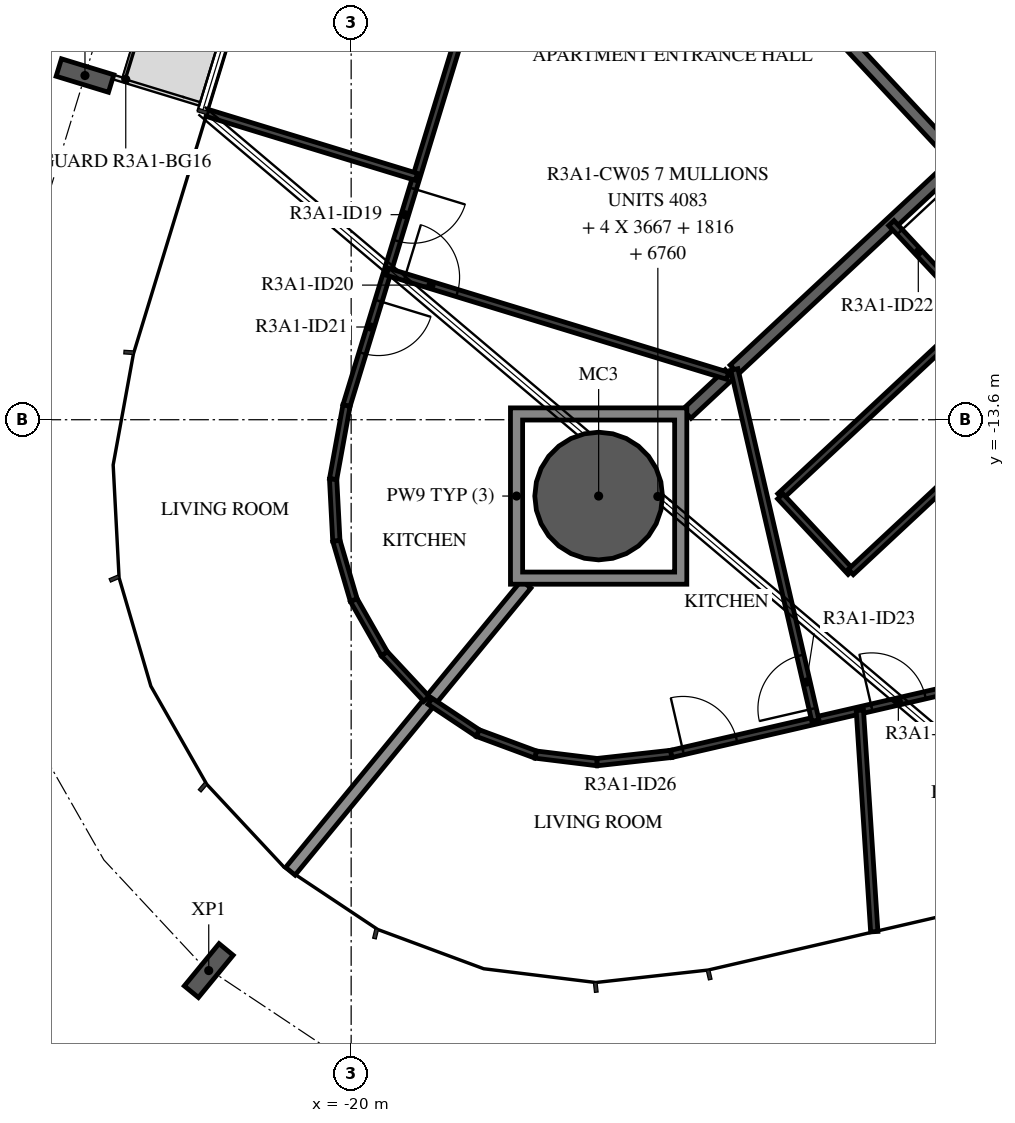
"""IFC4 building model, lengths in metres.
Left out: names, types, materials, properties, quantities, classifications, styles, units other than length and angle.
Written with IfcOpenShell. Run it as: python <this file> out.ifc"""

import sys

from ifc_helpers import new_model, si_unit, direction, frame, frame_2d, origin, origin_2d, place, context, subcontext, project, spatial, polyline, rectangle, hollow_circle, i_section, outline, extrude, element, fill, save


model = new_model("IFC4")
c1 = context("Model", 3, precision=1e-05, world=origin(), true_north=direction((0.0, 1.0)))
c2 = subcontext(c1, "Body", "Model", "MODEL_VIEW")
j1 = project(units=[si_unit("LENGTHUNIT", "METRE"), si_unit("PLANEANGLEUNIT", "RADIAN")], contexts=[c1])
p1 = place(None, origin())
s1 = spatial("IfcSite", under=j1, at=p1, CompositionType="ELEMENT")
p2 = place(p1, origin())
s2 = spatial("IfcBuilding", under=s1, at=p2, CompositionType="ELEMENT")
p3 = place(p2, frame((0.0, 0.0, 116.9)))
s3 = spatial("IfcBuildingStorey", under=s2, at=p3, CompositionType="ELEMENT", Elevation=116.9)
p4 = place(p3, frame((-15.93, -14.855, -0.38), z_axis=(0.0, 0.0, 1.0), x_axis=(1.0, 0.0, 0.0)))
e1 = element("IfcColumn", 1, at=p4, inside=s3, PredefinedType="COLUMN", context=c2, shape_type="SweptSolid", body=[
    extrude(hollow_circle(Radius=1.05, WallThickness=0.05, at=origin_2d()), origin(), (0.0, 0.0, 1.0), 3.5),
])
for number, where, z_axis, x_axis in (
    (2, (-24.377, -7.94, -0.38), (0.0, 0.0, 1.0), (0.292, 0.956, 0.0)),
    (3, (-22.342, -22.659, -0.38), (0.0, 0.0, 1.0), (-0.773, 0.635, 0.0)),
):
    element("IfcColumn", number, at=place(p3, frame(where, z_axis=z_axis, x_axis=x_axis)), inside=s3, PredefinedType="COLUMN", context=c2, shape_type="SweptSolid", body=[
        extrude(i_section(OverallWidth=0.3, OverallDepth=0.9, WebThickness=0.019, FlangeThickness=0.035, FilletRadius=0.03, at=origin_2d()), origin(), (0.0, 0.0, 1.0), 3.5),
    ])
p5 = place(p3, frame((-12.523, -6.659, 0.0), z_axis=(0.0, 0.0, 1.0), x_axis=(0.682001841105, -0.731350455479, 0.0)))
e4 = element("IfcWall", 4, at=p5, inside=s3, PredefinedType="STANDARD", context=c2, shape_type="SweptSolid", body=[
    extrude(rectangle(XDim=7.342, YDim=0.2, at=frame_2d((3.671, 0.0))), origin(), (0.0, 0.0, 1.0), 3.12),
])
p6 = place(p3, frame((-13.699, -12.774, 0.0), z_axis=(0.0, 0.0, 1.0), x_axis=(0.731353758457, 0.681998299111, 0.0)))
e5 = element("IfcWall", 5, at=p6, inside=s3, PredefinedType="STANDARD", context=c2, shape_type="SweptSolid", body=[
    extrude(rectangle(XDim=5.031, YDim=0.2, at=frame_2d((2.515, 0.0))), origin(), (0.0, 0.0, 1.0), 3.12),
])
p7 = place(p3, frame((-21.0, -21.025, 0.0), z_axis=(0.0, 0.0, 1.0), x_axis=(0.634846795952, 0.772638043116, 0.0)))
e6 = element("IfcWall", 6, at=p7, inside=s3, PredefinedType="STANDARD", context=c2, shape_type="SweptSolid", body=[
    extrude(rectangle(XDim=6.109, YDim=0.2, at=frame_2d((3.055, 0.0))), origin(), (0.0, 0.0, 1.0), 2.73),
])
p8 = place(p3, frame((-14.48, -13.503, 0.0), z_axis=(0.0, 0.0, 1.0), x_axis=(0.73152991834, 0.681809341806, 0.0)))
e7 = element("IfcWall", 7, at=p8, inside=s3, PredefinedType="STANDARD", context=c2, shape_type="SweptSolid", body=[
    extrude(rectangle(XDim=0.958, YDim=0.2, at=frame_2d((0.479, 0.0))), origin(), (0.0, 0.0, 1.0), 3.12),
])
p9 = place(p3, frame((-16.579, -1.928, 0.0), z_axis=(0.0, 0.0, 1.0), x_axis=(-0.29236733738, -0.956306091183, 0.0)))
e8 = element("IfcWall", 8, at=p9, inside=s3, PredefinedType="PARTITIONING", context=c2, shape_type="SweptSolid", body=[
    extrude(rectangle(XDim=11.963, YDim=0.12, at=frame_2d((5.981, 0.0))), origin(), (0.0, 0.0, 1.0), 3.12),
])
p10 = place(p9, frame((3.271, 0.0, 0.0)))
e9 = element("IfcOpeningElement", 9, at=p10, cuts=e8, PredefinedType="OPENING", context=c2, shape_type="SweptSolid", body=[
    extrude(rectangle(XDim=0.9, YDim=2.1, at=frame_2d((0.45, 1.05))), frame((0.0, 0.07, 0.0), z_axis=(0.0, -1.0, 0.0), x_axis=(1.0, 0.0, 0.0)), (0.0, 0.0, 1.0), 0.14),
])
p11 = place(p9, frame((8.229, 0.0, 0.0)))
e10 = element("IfcOpeningElement", 10, at=p11, cuts=e8, PredefinedType="OPENING", context=c2, shape_type="SweptSolid", body=[
    extrude(rectangle(XDim=0.9, YDim=2.1, at=frame_2d((0.45, 1.05))), frame((0.0, 0.07, 0.0), z_axis=(0.0, -1.0, 0.0), x_axis=(1.0, 0.0, 0.0)), (0.0, 0.0, 1.0), 0.14),
])
p12 = place(p9, frame((10.161, 0.0, 0.0)))
e11 = element("IfcOpeningElement", 11, at=p12, cuts=e8, PredefinedType="OPENING", context=c2, shape_type="SweptSolid", body=[
    extrude(rectangle(XDim=0.9, YDim=2.1, at=frame_2d((0.45, 1.05))), frame((0.0, 0.07, 0.0), z_axis=(0.0, -1.0, 0.0), x_axis=(1.0, 0.0, 0.0)), (0.0, 0.0, 1.0), 0.14),
])
p13 = place(p3, frame((-19.404, -11.167, 0.0), z_axis=(0.0, 0.0, 1.0), x_axis=(0.956314306829, -0.292340463423, 0.0)))
e12 = element("IfcWall", 12, at=p13, inside=s3, PredefinedType="PARTITIONING", context=c2, shape_type="SweptSolid", body=[
    extrude(rectangle(XDim=5.85, YDim=0.12, at=frame_2d((2.925, 0.0))), origin(), (0.0, 0.0, 1.0), 3.12),
])
p14 = place(p13, frame((0.3, 0.0, 0.0)))
e13 = element("IfcOpeningElement", 13, at=p14, cuts=e12, PredefinedType="OPENING", context=c2, shape_type="SweptSolid", body=[
    extrude(rectangle(XDim=0.9, YDim=2.1, at=frame_2d((0.45, 1.05))), frame((0.0, 0.07, 0.0), z_axis=(0.0, -1.0, 0.0), x_axis=(1.0, 0.0, 0.0)), (0.0, 0.0, 1.0), 0.14),
])
p15 = place(p3, frame((-22.369, -8.554, 0.0), z_axis=(0.0, 0.0, 1.0), x_axis=(0.956306810244, -0.292364985388, 0.0)))
e14 = element("IfcWall", 14, at=p15, inside=s3, PredefinedType="PARTITIONING", context=c2, shape_type="SweptSolid", body=[
    extrude(rectangle(XDim=3.6, YDim=0.12, at=frame_2d((1.8, 0.0))), origin(), (0.0, 0.0, 1.0), 2.73),
])
for number, where, z_axis, x_axis in (
    (15, (-18.762, -18.19, 0.0), (0.0, 0.0, 1.0), (-0.682, 0.731, 0.0)),
    (16, (-19.455, -17.448, 0.0), (0.0, 0.0, 1.0), (-0.495, 0.869, 0.0)),
    (17, (-19.958, -16.565, 0.0), (0.0, 0.0, 1.0), (-0.281, 0.96, 0.0)),
):
    element("IfcWall", number, at=place(p3, frame(where, z_axis=z_axis, x_axis=x_axis)), inside=s3, PredefinedType="PARTITIONING", context=c2, shape_type="SweptSolid", body=[
        extrude(rectangle(XDim=1.016, YDim=0.12, at=frame_2d((0.508, 0.0))), origin(), (0.0, 0.0, 1.0), 3.12),
    ])
p16 = place(p3, frame((-20.244, -15.59, 0.0), z_axis=(0.0, 0.0, 1.0), x_axis=(-0.052142637988, 0.998639647372, 0.0)))
e18 = element("IfcWall", 18, at=p16, inside=s3, PredefinedType="PARTITIONING", context=c2, shape_type="SweptSolid", body=[
    extrude(rectangle(XDim=1.016, YDim=0.12, at=frame_2d((0.508, 0.0))), origin(), (0.0, 0.0, 1.0), 3.12),
])
p17 = place(p3, frame((-20.297, -14.575, 0.0), z_axis=(0.0, 0.0, 1.0), x_axis=(0.179288174895, 0.983796600087, 0.0)))
e19 = element("IfcWall", 19, at=p17, inside=s3, PredefinedType="PARTITIONING", context=c2, shape_type="SweptSolid", body=[
    extrude(rectangle(XDim=1.227, YDim=0.12, at=frame_2d((0.613, 0.0))), origin(), (0.0, 0.0, 1.0), 3.12),
])
p18 = place(p3, frame((-11.117, -10.366, 0.0), z_axis=(0.0, 0.0, 1.0), x_axis=(0.682041233274, -0.731313719353, 0.0)))
e20 = element("IfcWall", 20, at=p18, inside=s3, PredefinedType="PARTITIONING", context=c2, shape_type="SweptSolid", body=[
    extrude(rectangle(XDim=2.042, YDim=0.12, at=frame_2d((1.021, 0.0))), origin(), (0.0, 0.0, 1.0), 3.12),
])
p19 = place(p18, frame((0.2, 0.0, 0.0)))
e21 = element("IfcOpeningElement", 21, at=p19, cuts=e20, PredefinedType="OPENING", context=c2, shape_type="SweptSolid", body=[
    extrude(rectangle(XDim=0.9, YDim=2.1, at=frame_2d((0.45, 1.05))), frame((0.0, 0.07, 0.0), z_axis=(0.0, -1.0, 0.0), x_axis=(1.0, 0.0, 0.0)), (0.0, 0.0, 1.0), 0.14),
])
p20 = place(p3, frame((-9.724, -11.859, 0.0), z_axis=(0.0, 0.0, 1.0), x_axis=(-0.731365154613, -0.681986078023, 0.0)))
e22 = element("IfcWall", 22, at=p20, inside=s3, PredefinedType="PARTITIONING", context=c2, shape_type="SweptSolid", body=[
    extrude(rectangle(XDim=4.4, YDim=0.12, at=frame_2d((2.2, 0.0))), origin(), (0.0, 0.0, 1.0), 3.12),
])
p21 = place(p3, frame((-12.943, -14.86, 0.0), z_axis=(0.0, 0.0, 1.0), x_axis=(0.682046998737, -0.731308342297, 0.0)))
e23 = element("IfcWall", 23, at=p21, inside=s3, PredefinedType="PARTITIONING", context=c2, shape_type="SweptSolid", body=[
    extrude(rectangle(XDim=1.7, YDim=0.12, at=frame_2d((0.85, 0.0))), origin(), (0.0, 0.0, 1.0), 3.12),
])
p22 = place(p3, frame((-11.783, -16.104, 0.0), z_axis=(0.0, 0.0, 1.0), x_axis=(0.731365154613, 0.681986078023, 0.0)))
e24 = element("IfcWall", 24, at=p22, inside=s3, PredefinedType="PARTITIONING", context=c2, shape_type="SweptSolid", body=[
    extrude(rectangle(XDim=4.4, YDim=0.12, at=frame_2d((2.2, 0.0))), origin(), (0.0, 0.0, 1.0), 3.12),
])
p23 = place(p3, frame((-18.703, -18.23, 0.0), z_axis=(0.0, 0.0, 1.0), x_axis=(0.832328473933, -0.554282699965, 0.0)))
e25 = element("IfcWall", 25, at=p23, inside=s3, PredefinedType="PARTITIONING", context=c2, shape_type="SweptSolid", body=[
    extrude(rectangle(XDim=0.945, YDim=0.12, at=frame_2d((0.472, 0.0))), origin(), (0.0, 0.0, 1.0), 3.12),
])
p24 = place(p3, frame((-17.917, -18.754, 0.0), z_axis=(0.0, 0.0, 1.0), x_axis=(0.937684971769, -0.347486537462, 0.0)))
e26 = element("IfcWall", 26, at=p24, inside=s3, PredefinedType="PARTITIONING", context=c2, shape_type="SweptSolid", body=[
    extrude(rectangle(XDim=1.016, YDim=0.12, at=frame_2d((0.508, 0.0))), origin(), (0.0, 0.0, 1.0), 3.12),
])
p25 = place(p3, frame((-16.964, -19.107, 0.0), z_axis=(0.0, 0.0, 1.0), x_axis=(0.992523553766, -0.122053247474, 0.0)))
e27 = element("IfcWall", 27, at=p25, inside=s3, PredefinedType="PARTITIONING", context=c2, shape_type="SweptSolid", body=[
    extrude(rectangle(XDim=1.016, YDim=0.12, at=frame_2d((0.508, 0.0))), origin(), (0.0, 0.0, 1.0), 3.12),
])
p26 = place(p3, frame((-15.956, -19.231, 0.0), z_axis=(0.0, 0.0, 1.0), x_axis=(0.993883734674, 0.110431526075, 0.0)))
e28 = element("IfcWall", 28, at=p26, inside=s3, PredefinedType="PARTITIONING", context=c2, shape_type="SweptSolid", body=[
    extrude(rectangle(XDim=1.227, YDim=0.12, at=frame_2d((0.614, 0.0))), origin(), (0.0, 0.0, 1.0), 3.12),
])
p27 = place(p3, frame((-14.736, -19.095, 0.0), z_axis=(0.0, 0.0, 1.0), x_axis=(0.974369132722, 0.224955091516, 0.0)))
e29 = element("IfcWall", 29, at=p27, inside=s3, PredefinedType="PARTITIONING", context=c2, shape_type="SweptSolid", body=[
    extrude(rectangle(XDim=18.654, YDim=0.12, at=frame_2d((9.327, 0.0))), origin(), (0.0, 0.0, 1.0), 3.12),
])
p28 = place(p27, frame((3.383, 0.0, 0.0)))
e30 = element("IfcOpeningElement", 30, at=p28, cuts=e29, PredefinedType="OPENING", context=c2, shape_type="SweptSolid", body=[
    extrude(rectangle(XDim=0.9, YDim=2.1, at=frame_2d((0.45, 1.05))), frame((0.0, 0.07, 0.0), z_axis=(0.0, -1.0, 0.0), x_axis=(1.0, 0.0, 0.0)), (0.0, 0.0, 1.0), 0.14),
])
p29 = place(p27, frame((6.81, 0.0, 0.0)))
e31 = element("IfcOpeningElement", 31, at=p29, cuts=e29, PredefinedType="OPENING", context=c2, shape_type="SweptSolid", body=[
    extrude(rectangle(XDim=0.9, YDim=2.1, at=frame_2d((0.45, 1.05))), frame((0.0, 0.07, 0.0), z_axis=(0.0, -1.0, 0.0), x_axis=(1.0, 0.0, 0.0)), (0.0, 0.0, 1.0), 0.14),
])
p30 = place(p27, frame((0.2, 0.0, 0.0)))
e32 = element("IfcOpeningElement", 32, at=p30, cuts=e29, PredefinedType="OPENING", context=c2, shape_type="SweptSolid", body=[
    extrude(rectangle(XDim=0.9, YDim=2.1, at=frame_2d((0.45, 1.05))), frame((0.0, 0.07, 0.0), z_axis=(0.0, -1.0, 0.0), x_axis=(1.0, 0.0, 0.0)), (0.0, 0.0, 1.0), 0.14),
])
p31 = place(p27, frame((14.839, 0.0, 0.0)))
e33 = element("IfcOpeningElement", 33, at=p31, cuts=e29, PredefinedType="OPENING", context=c2, shape_type="SweptSolid", body=[
    extrude(rectangle(XDim=0.9, YDim=2.1, at=frame_2d((0.45, 1.05))), frame((0.0, 0.07, 0.0), z_axis=(0.0, -1.0, 0.0), x_axis=(1.0, 0.0, 0.0)), (0.0, 0.0, 1.0), 0.14),
])
p32 = place(p3, frame((-12.366, -18.548, 0.0), z_axis=(0.0, 0.0, 1.0), x_axis=(-0.224958805164, 0.974368275335, 0.0)))
e34 = element("IfcWall", 34, at=p32, inside=s3, PredefinedType="PARTITIONING", context=c2, shape_type="SweptSolid", body=[
    extrude(rectangle(XDim=5.926, YDim=0.12, at=frame_2d((2.963, 0.0))), origin(), (0.0, 0.0, 1.0), 3.12),
])
p33 = place(p32, frame((0.2, 0.0, 0.0)))
e35 = element("IfcOpeningElement", 35, at=p33, cuts=e34, PredefinedType="OPENING", context=c2, shape_type="SweptSolid", body=[
    extrude(rectangle(XDim=0.9, YDim=2.1, at=frame_2d((0.45, 1.05))), frame((0.0, 0.07, 0.0), z_axis=(0.0, -1.0, 0.0), x_axis=(1.0, 0.0, 0.0)), (0.0, 0.0, 1.0), 0.14),
])
p34 = place(p3, frame((-11.397, -22.019, 0.0), z_axis=(0.0, 0.0, 1.0), x_axis=(-0.065124052048, 0.997877175731, 0.0)))
e36 = element("IfcWall", 36, at=p34, inside=s3, PredefinedType="PARTITIONING", context=c2, shape_type="SweptSolid", body=[
    extrude(rectangle(XDim=3.648, YDim=0.12, at=frame_2d((1.824, 0.0))), origin(), (0.0, 0.0, 1.0), 3.12),
])
p35 = place(p3, origin())
e37 = element("IfcWall", 37, at=p35, inside=s3, PredefinedType="STANDARD", context=c2, shape_type="SweptSolid", body=[
    extrude(outline(polyline([(-14.48, -13.405), (-14.48, -16.305), (-17.38, -16.305), (-17.38, -13.405), (-14.48, -13.405)]), holes=[polyline([(-17.18, -16.105), (-14.68, -16.105), (-14.68, -13.605), (-17.18, -13.605), (-17.18, -16.105)])]), origin(), (0.0, 0.0, 1.0), 3.12),
])
p36 = place(p11, origin())
e38 = element("IfcDoor", 38, at=p36, inside=s3, OperationType="SINGLE_SWING_RIGHT", PredefinedType="DOOR", context=c2, shape_type="SweptSolid", body=[
    extrude(rectangle(XDim=0.9, YDim=2.1, at=frame_2d((0.45, 1.05))), frame((0.0, 0.025, 0.0), z_axis=(0.0, -1.0, 0.0), x_axis=(1.0, 0.0, 0.0)), (0.0, 0.0, 1.0), 0.05),
])
fill(e10, e38)
p37 = place(p14, origin())
e39 = element("IfcDoor", 39, at=p37, inside=s3, OperationType="SINGLE_SWING_RIGHT", PredefinedType="DOOR", context=c2, shape_type="SweptSolid", body=[
    extrude(rectangle(XDim=0.9, YDim=2.1, at=frame_2d((0.45, 1.05))), frame((0.0, 0.025, 0.0), z_axis=(0.0, -1.0, 0.0), x_axis=(1.0, 0.0, 0.0)), (0.0, 0.0, 1.0), 0.05),
])
fill(e13, e39)
p38 = place(p12, origin())
e40 = element("IfcDoor", 40, at=p38, inside=s3, OperationType="SINGLE_SWING_LEFT", PredefinedType="DOOR", context=c2, shape_type="SweptSolid", body=[
    extrude(rectangle(XDim=0.9, YDim=2.1, at=frame_2d((0.45, 1.05))), frame((0.0, 0.025, 0.0), z_axis=(0.0, -1.0, 0.0), x_axis=(1.0, 0.0, 0.0)), (0.0, 0.0, 1.0), 0.05),
])
fill(e11, e40)
p39 = place(p19, origin())
e41 = element("IfcDoor", 41, at=p39, inside=s3, OperationType="SINGLE_SWING_LEFT", PredefinedType="DOOR", context=c2, shape_type="SweptSolid", body=[
    extrude(rectangle(XDim=0.9, YDim=2.1, at=frame_2d((0.45, 1.05))), frame((0.0, 0.025, 0.0), z_axis=(0.0, -1.0, 0.0), x_axis=(1.0, 0.0, 0.0)), (0.0, 0.0, 1.0), 0.05),
])
fill(e21, e41)
p40 = place(p33, origin())
e42 = element("IfcDoor", 42, at=p40, inside=s3, OperationType="SINGLE_SWING_LEFT", PredefinedType="DOOR", context=c2, shape_type="SweptSolid", body=[
    extrude(rectangle(XDim=0.9, YDim=2.1, at=frame_2d((0.45, 1.05))), frame((0.0, 0.025, 0.0), z_axis=(0.0, -1.0, 0.0), x_axis=(1.0, 0.0, 0.0)), (0.0, 0.0, 1.0), 0.05),
])
fill(e35, e42)
p41 = place(p28, origin())
e43 = element("IfcDoor", 43, at=p41, inside=s3, OperationType="SINGLE_SWING_LEFT", PredefinedType="DOOR", context=c2, shape_type="SweptSolid", body=[
    extrude(rectangle(XDim=0.9, YDim=2.1, at=frame_2d((0.45, 1.05))), frame((0.0, 0.025, 0.0), z_axis=(0.0, -1.0, 0.0), x_axis=(1.0, 0.0, 0.0)), (0.0, 0.0, 1.0), 0.05),
])
fill(e30, e43)
p42 = place(p30, origin())
e44 = element("IfcDoor", 44, at=p42, inside=s3, OperationType="SINGLE_SWING_RIGHT", PredefinedType="DOOR", context=c2, shape_type="SweptSolid", body=[
    extrude(rectangle(XDim=0.9, YDim=2.1, at=frame_2d((0.45, 1.05))), frame((0.0, 0.025, 0.0), z_axis=(0.0, -1.0, 0.0), x_axis=(1.0, 0.0, 0.0)), (0.0, 0.0, 1.0), 0.05),
])
fill(e32, e44)
save(model, sys.argv[1])
